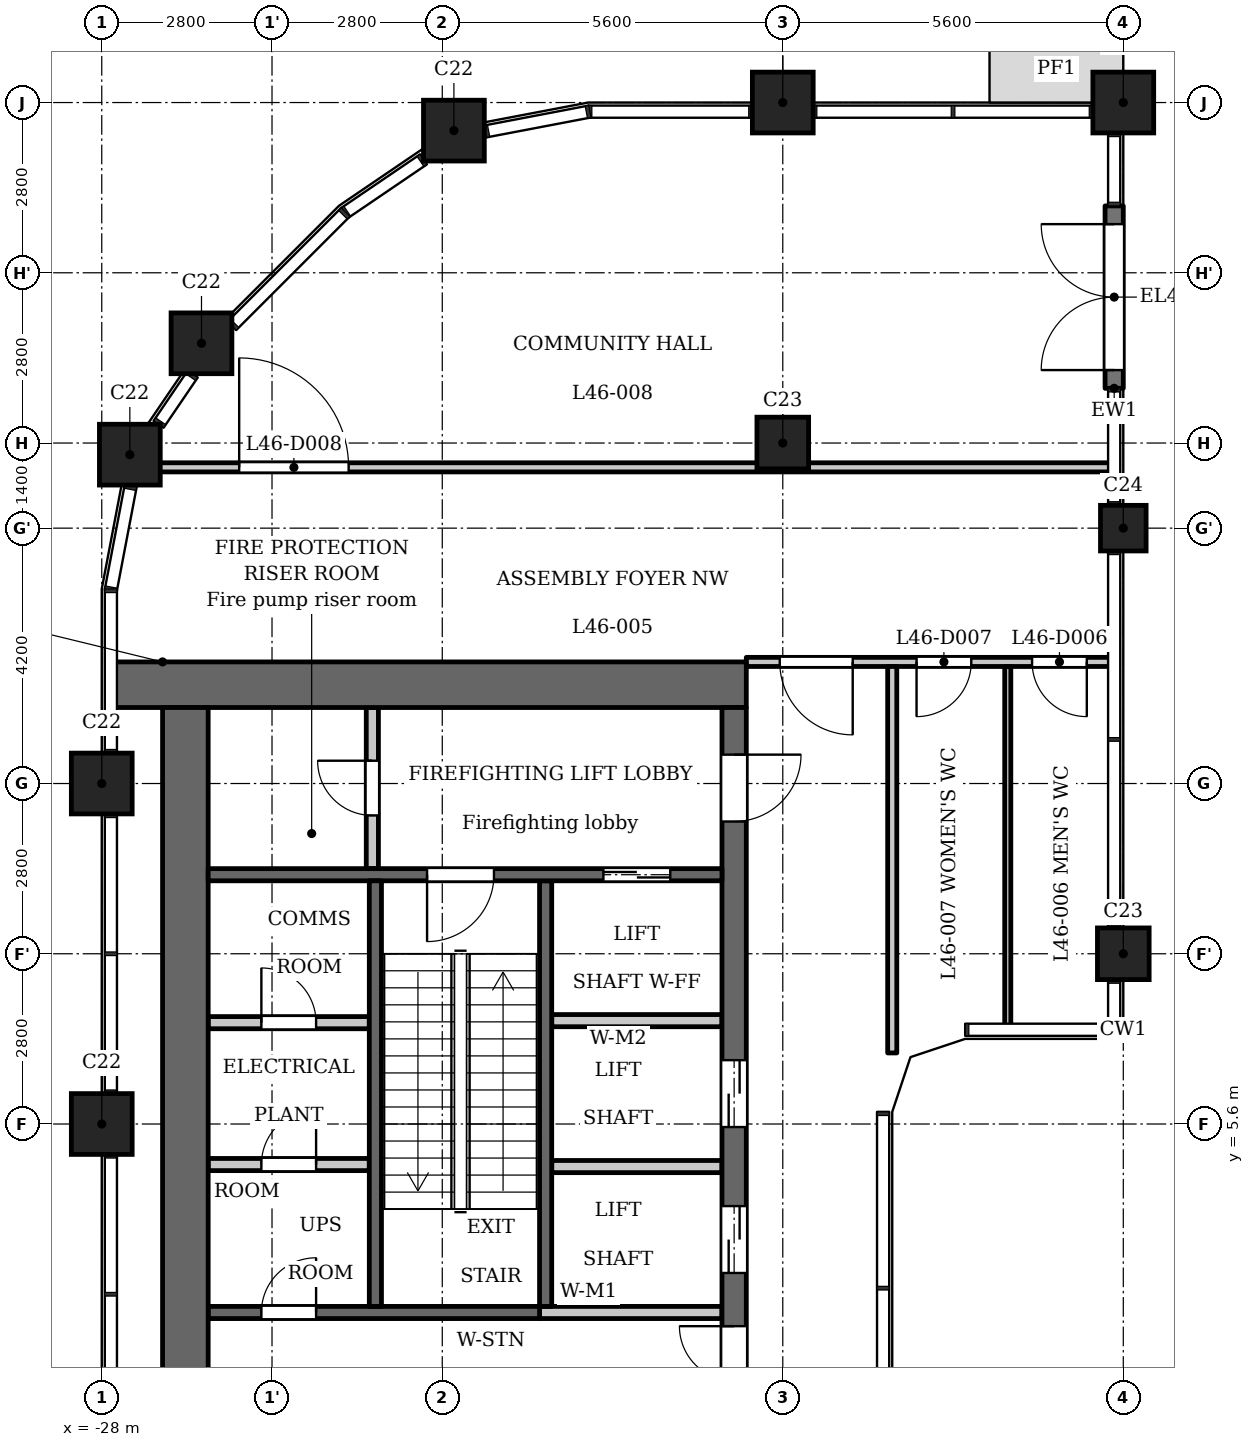
"""IFC4 building model, lengths in metres.
Left out: names, types, materials, properties, quantities, classifications, styles, units other than length and angle.
Written with IfcOpenShell. Run it as: python <this file> out.ifc"""

import sys

from ifc_helpers import new_model, si_unit, direction, frame, frame_2d, origin, origin_2d, place, context, subcontext, project, spatial, polyline, rectangle, outline, extrude, element, fill, save


model = new_model("IFC4")
c1 = context("Model", 3, precision=1e-05, world=origin(), true_north=direction((0.0, 1.0)))
c2 = subcontext(c1, "Body", "Model", "MODEL_VIEW")
j1 = project(units=[si_unit("LENGTHUNIT", "METRE"), si_unit("PLANEANGLEUNIT", "RADIAN")], contexts=[c1])
p1 = place(None, origin())
s1 = spatial("IfcSite", under=j1, at=p1, CompositionType="ELEMENT")
p2 = place(p1, origin())
s2 = spatial("IfcBuilding", under=s1, at=p2, CompositionType="ELEMENT")
p3 = place(p2, frame((0.0, 0.0, 178.1)))
s3 = spatial("IfcBuildingStorey", under=s2, at=p3, CompositionType="ELEMENT", Elevation=178.1)
for number, where, z_axis, x_axis in (
    (1, (-11.2, 22.4, 0.0), (0.0, 0.0, 1.0), (1.0, 0.0, 0.0)),
    (2, (-16.8, 22.4, 0.0), (0.0, 0.0, 1.0), (1.0, 0.0, 0.0)),
    (3, (-22.209, 21.938, 0.0), (0.0, 0.0, 1.0), (1.0, 0.0, 0.0)),
    (4, (-26.36, 18.44, 0.0), (0.0, 0.0, 1.0), (1.0, 0.0, 0.0)),
    (5, (-27.538, 16.609, 0.0), (0.0, 0.0, 1.0), (1.0, 0.0, 0.0)),
    (6, (-28.0, 11.2, 0.0), (0.0, 0.0, 1.0), (1.0, 0.0, 0.0)),
    (7, (-28.0, 5.6, 0.0), (0.0, 0.0, 1.0), (1.0, 0.0, 0.0)),
):
    element("IfcColumn", number, at=place(p3, frame(where, z_axis=z_axis, x_axis=x_axis)), inside=s3, PredefinedType="COLUMN", context=c2, shape_type="SweptSolid", body=[
        extrude(rectangle(XDim=1.0, YDim=1.0, at=origin_2d()), origin(), (0.0, 0.0, 1.0), 5.4),
    ])
for number, where, z_axis, x_axis in (
    (8, (-16.8, 16.8, 0.0), (0.0, 0.0, 1.0), (1.0, 0.0, 0.0)),
    (9, (-11.2, 8.4, 0.0), (0.0, 0.0, 1.0), (1.0, 0.0, 0.0)),
):
    element("IfcColumn", number, at=place(p3, frame(where, z_axis=z_axis, x_axis=x_axis)), inside=s3, PredefinedType="COLUMN", context=c2, shape_type="SweptSolid", body=[
        extrude(rectangle(XDim=0.85, YDim=0.85, at=origin_2d()), origin(), (0.0, 0.0, 1.0), 5.4),
    ])
p4 = place(p3, frame((-11.2, 15.4, 0.0), z_axis=(0.0, 0.0, 1.0), x_axis=(1.0, 0.0, 0.0)))
e10 = element("IfcColumn", 10, at=p4, inside=s3, PredefinedType="COLUMN", context=c2, shape_type="SweptSolid", body=[
    extrude(rectangle(XDim=0.75, YDim=0.75, at=origin_2d()), origin(), (0.0, 0.0, 1.0), 5.4),
])
p5 = place(p3, frame((-11.35, 17.7, 0.0), z_axis=(0.0, 0.0, 1.0), x_axis=(0.0, 1.0, 0.0)))
e11 = element("IfcWall", 11, at=p5, inside=s3, PredefinedType="SOLIDWALL", context=c2, shape_type="SweptSolid", body=[
    extrude(rectangle(XDim=3.0, YDim=0.3, at=frame_2d((1.5, 0.0))), origin(), (0.0, 0.0, 1.0), 4.95),
])
p6 = place(p5, frame((0.3, 0.0, 0.0)))
e12 = element("IfcOpeningElement", 12, at=p6, cuts=e11, PredefinedType="OPENING", context=c2, shape_type="SweptSolid", body=[
    extrude(rectangle(XDim=2.4, YDim=2.3, at=frame_2d((1.2, 1.15))), frame((0.0, 0.16, 0.0), z_axis=(0.0, -1.0, 0.0), x_axis=(1.0, 0.0, 0.0)), (0.0, 0.0, 1.0), 0.32),
])
p7 = place(p3, frame((-20.7, 2.6, 0.0), z_axis=(0.0, 0.0, 1.0), x_axis=(0.0, 1.0, 0.0)))
e13 = element("IfcWall", 13, at=p7, inside=s3, PredefinedType="SHEAR", context=c2, shape_type="SweptSolid", body=[
    extrude(rectangle(XDim=7.0, YDim=0.2, at=frame_2d((3.5, 0.0))), origin(), (0.0, 0.0, 1.0), 4.95),
])
p8 = place(p3, frame((-20.8, 2.5, 0.0), z_axis=(0.0, 0.0, 1.0), x_axis=(-1.0, 0.0, 0.0)))
e14 = element("IfcWall", 14, at=p8, inside=s3, PredefinedType="SHEAR", context=c2, shape_type="SweptSolid", body=[
    extrude(rectangle(XDim=5.45, YDim=0.2, at=frame_2d((2.725, 0.0))), origin(), (0.0, 0.0, 1.0), 4.95),
])
p9 = place(p8, frame((3.675, 0.0, 0.0)))
e15 = element("IfcOpeningElement", 15, at=p9, cuts=e14, PredefinedType="OPENING", context=c2, shape_type="SweptSolid", body=[
    extrude(rectangle(XDim=0.9, YDim=2.1, at=frame_2d((0.45, 1.05))), frame((0.0, 0.11, 0.0), z_axis=(0.0, -1.0, 0.0), x_axis=(1.0, 0.0, 0.0)), (0.0, 0.0, 1.0), 0.22),
])
p10 = place(p3, frame((-17.4, 12.825, 0.0), z_axis=(0.0, 0.0, 1.0), x_axis=(-1.0, 0.0, 0.0)))
e16 = element("IfcWall", 16, at=p10, inside=s3, PredefinedType="SHEAR", context=c2, shape_type="SweptSolid", body=[
    extrude(rectangle(XDim=10.4, YDim=0.75, at=frame_2d((5.2, 0.0))), origin(), (0.0, 0.0, 1.0), 4.95),
])
p11 = place(p3, frame((-17.6, -12.45, 0.0), z_axis=(0.0, 0.0, 1.0), x_axis=(0.0, 1.0, 0.0)))
e17 = element("IfcWall", 17, at=p11, inside=s3, PredefinedType="SHEAR", context=c2, shape_type="SweptSolid", body=[
    extrude(rectangle(XDim=24.9, YDim=0.4, at=frame_2d((12.45, 0.0))), origin(), (0.0, 0.0, 1.0), 4.95),
])
p12 = place(p11, frame((6.85, 0.0, 0.0)))
e18 = element("IfcOpeningElement", 18, at=p12, cuts=e17, PredefinedType="OPENING", context=c2, shape_type="SweptSolid", body=[
    extrude(rectangle(XDim=0.9, YDim=2.1, at=frame_2d((0.45, 1.05))), frame((0.0, 0.21, 0.0), z_axis=(0.0, -1.0, 0.0), x_axis=(1.0, 0.0, 0.0)), (0.0, 0.0, 1.0), 0.42),
])
p13 = place(p11, frame((10.45, 0.0, 0.0)))
e19 = element("IfcOpeningElement", 19, at=p13, cuts=e17, PredefinedType="OPENING", context=c2, shape_type="SweptSolid", body=[
    extrude(rectangle(XDim=0.9, YDim=2.1, at=frame_2d((0.45, 1.05))), frame((0.0, 0.21, 0.0), z_axis=(0.0, -1.0, 0.0), x_axis=(1.0, 0.0, 0.0)), (0.0, 0.0, 1.0), 0.42),
])
p14 = place(p11, frame((15.6, 0.0, 0.0)))
e20 = element("IfcOpeningElement", 20, at=p14, cuts=e17, PredefinedType="OPENING", context=c2, shape_type="SweptSolid", body=[
    extrude(rectangle(XDim=1.1, YDim=2.1, at=frame_2d((0.55, 1.05))), frame((0.0, 0.21, 0.0), z_axis=(0.0, -1.0, 0.0), x_axis=(1.0, 0.0, 0.0)), (0.0, 0.0, 1.0), 0.42),
])
p15 = place(p11, frame((18.0, 0.0, 0.0)))
e21 = element("IfcOpeningElement", 21, at=p15, cuts=e17, PredefinedType="OPENING", context=c2, shape_type="SweptSolid", body=[
    extrude(rectangle(XDim=1.1, YDim=2.1, at=frame_2d((0.55, 1.05))), frame((0.0, 0.21, 0.0), z_axis=(0.0, -1.0, 0.0), x_axis=(1.0, 0.0, 0.0)), (0.0, 0.0, 1.0), 0.42),
])
p16 = place(p11, frame((23.025, 0.0, 0.0)))
e22 = element("IfcOpeningElement", 22, at=p16, cuts=e17, PredefinedType="OPENING", context=c2, shape_type="SweptSolid", body=[
    extrude(rectangle(XDim=1.1, YDim=2.1, at=frame_2d((0.55, 1.05))), frame((0.0, 0.21, 0.0), z_axis=(0.0, -1.0, 0.0), x_axis=(1.0, 0.0, 0.0)), (0.0, 0.0, 1.0), 0.42),
])
p17 = place(p11, frame((0.775, 0.0, 0.0)))
e23 = element("IfcOpeningElement", 23, at=p17, cuts=e17, PredefinedType="OPENING", context=c2, shape_type="SweptSolid", body=[
    extrude(rectangle(XDim=1.1, YDim=2.1, at=frame_2d((0.55, 1.05))), frame((0.0, 0.21, 0.0), z_axis=(0.0, -1.0, 0.0), x_axis=(1.0, 0.0, 0.0)), (0.0, 0.0, 1.0), 0.42),
])
p18 = place(p11, frame((12.925, 0.0, 0.0)))
e24 = element("IfcOpeningElement", 24, at=p18, cuts=e17, PredefinedType="OPENING", context=c2, shape_type="SweptSolid", body=[
    extrude(rectangle(XDim=1.8, YDim=2.1, at=frame_2d((0.9, 1.05))), frame((0.0, 0.21, 0.0), z_axis=(0.0, -1.0, 0.0), x_axis=(1.0, 0.0, 0.0)), (0.0, 0.0, 1.0), 0.42),
])
p19 = place(p3, frame((-26.625, -12.45, 0.0), z_axis=(0.0, 0.0, 1.0), x_axis=(0.0, 1.0, 0.0)))
e25 = element("IfcWall", 25, at=p19, inside=s3, PredefinedType="SHEAR", context=c2, shape_type="SweptSolid", body=[
    extrude(rectangle(XDim=24.9, YDim=0.75, at=frame_2d((12.45, 0.0))), origin(), (0.0, 0.0, 1.0), 4.95),
])
p20 = place(p3, frame((-23.55, 9.8, 0.0), z_axis=(0.0, 0.0, 1.0), x_axis=(0.0, 1.0, 0.0)))
e26 = element("IfcWall", 26, at=p20, inside=s3, PredefinedType="PARTITIONING", context=c2, shape_type="SweptSolid", body=[
    extrude(rectangle(XDim=2.65, YDim=0.2, at=frame_2d((1.325, 0.0))), origin(), (0.0, 0.0, 1.0), 4.95),
])
p21 = place(p20, frame((0.875, 0.0, 0.0)))
e27 = element("IfcOpeningElement", 27, at=p21, cuts=e26, PredefinedType="OPENING", context=c2, shape_type="SweptSolid", body=[
    extrude(rectangle(XDim=0.9, YDim=2.1, at=frame_2d((0.45, 1.05))), frame((0.0, 0.11, 0.0), z_axis=(0.0, -1.0, 0.0), x_axis=(1.0, 0.0, 0.0)), (0.0, 0.0, 1.0), 0.22),
])
p22 = place(p3, frame((-23.6, 4.933, 0.0), z_axis=(0.0, 0.0, 1.0), x_axis=(-1.0, 0.0, 0.0)))
e28 = element("IfcWall", 28, at=p22, inside=s3, PredefinedType="PARTITIONING", context=c2, shape_type="SweptSolid", body=[
    extrude(rectangle(XDim=2.65, YDim=0.2, at=frame_2d((1.325, 0.0))), origin(), (0.0, 0.0, 1.0), 4.95),
])
p23 = place(p22, frame((0.875, 0.0, 0.0)))
e29 = element("IfcOpeningElement", 29, at=p23, cuts=e28, PredefinedType="OPENING", context=c2, shape_type="SweptSolid", body=[
    extrude(rectangle(XDim=0.9, YDim=2.1, at=frame_2d((0.45, 1.05))), frame((0.0, 0.11, 0.0), z_axis=(0.0, -1.0, 0.0), x_axis=(1.0, 0.0, 0.0)), (0.0, 0.0, 1.0), 0.22),
])
p24 = place(p3, frame((-23.6, 7.267, 0.0), z_axis=(0.0, 0.0, 1.0), x_axis=(-1.0, 0.0, 0.0)))
e30 = element("IfcWall", 30, at=p24, inside=s3, PredefinedType="PARTITIONING", context=c2, shape_type="SweptSolid", body=[
    extrude(rectangle(XDim=2.65, YDim=0.2, at=frame_2d((1.325, 0.0))), origin(), (0.0, 0.0, 1.0), 4.95),
])
p25 = place(p24, frame((0.875, 0.0, 0.0)))
e31 = element("IfcOpeningElement", 31, at=p25, cuts=e30, PredefinedType="OPENING", context=c2, shape_type="SweptSolid", body=[
    extrude(rectangle(XDim=0.9, YDim=2.1, at=frame_2d((0.45, 1.05))), frame((0.0, 0.11, 0.0), z_axis=(0.0, -1.0, 0.0), x_axis=(1.0, 0.0, 0.0)), (0.0, 0.0, 1.0), 0.22),
])
p26 = place(p3, frame((-17.8, 2.5, 0.0), z_axis=(0.0, 0.0, 1.0), x_axis=(-1.0, 0.0, 0.0)))
e32 = element("IfcWall", 32, at=p26, inside=s3, PredefinedType="PARTITIONING", context=c2, shape_type="SweptSolid", body=[
    extrude(rectangle(XDim=3.0, YDim=0.2, at=frame_2d((1.5, 0.0))), origin(), (0.0, 0.0, 1.0), 4.95),
])
for number, where, z_axis, x_axis in (
    (33, (-17.8, 4.9, 0.0), (0.0, 0.0, 1.0), (-1.0, 0.0, 0.0)),
    (34, (-17.8, 7.3, 0.0), (0.0, 0.0, 1.0), (-1.0, 0.0, 0.0)),
):
    element("IfcWall", number, at=place(p3, frame(where, z_axis=z_axis, x_axis=x_axis)), inside=s3, PredefinedType="PARTITIONING", context=c2, shape_type="SweptSolid", body=[
        extrude(rectangle(XDim=2.8, YDim=0.2, at=frame_2d((1.4, 0.0))), origin(), (0.0, 0.0, 1.0), 4.95),
    ])
p27 = place(p3, frame((-17.8, 9.7, 0.0), z_axis=(0.0, 0.0, 1.0), x_axis=(-1.0, 0.0, 0.0)))
e35 = element("IfcWall", 35, at=p27, inside=s3, PredefinedType="SHEAR", context=c2, shape_type="SweptSolid", body=[
    extrude(rectangle(XDim=8.45, YDim=0.2, at=frame_2d((4.225, 0.0))), origin(), (0.0, 0.0, 1.0), 4.95),
])
p28 = place(p27, frame((0.85, 0.0, 0.0)))
e36 = element("IfcOpeningElement", 36, at=p28, cuts=e35, PredefinedType="OPENING", context=c2, shape_type="SweptSolid", body=[
    extrude(rectangle(XDim=1.1, YDim=2.1, at=frame_2d((0.55, 1.05))), frame((0.0, 0.11, 0.0), z_axis=(0.0, -1.0, 0.0), x_axis=(1.0, 0.0, 0.0)), (0.0, 0.0, 1.0), 0.22),
])
p29 = place(p27, frame((3.75, 0.0, 0.0)))
e37 = element("IfcOpeningElement", 37, at=p29, cuts=e35, PredefinedType="OPENING", context=c2, shape_type="SweptSolid", body=[
    extrude(rectangle(XDim=1.1, YDim=2.1, at=frame_2d((0.55, 1.05))), frame((0.0, 0.11, 0.0), z_axis=(0.0, -1.0, 0.0), x_axis=(1.0, 0.0, 0.0)), (0.0, 0.0, 1.0), 0.22),
])
p30 = place(p3, frame((-23.5, 2.6, 0.0), z_axis=(0.0, 0.0, 1.0), x_axis=(0.0, 1.0, 0.0)))
e38 = element("IfcWall", 38, at=p30, inside=s3, PredefinedType="SHEAR", context=c2, shape_type="SweptSolid", body=[
    extrude(rectangle(XDim=7.0, YDim=0.2, at=frame_2d((3.5, 0.0))), origin(), (0.0, 0.0, 1.0), 4.95),
])
p31 = place(p3, frame((-17.4, 13.2, 0.0), z_axis=(0.0, 0.0, 1.0), x_axis=(1.0, 0.0, 0.0)))
e39 = element("IfcWall", 39, at=p31, inside=s3, PredefinedType="PARTITIONING", context=c2, shape_type="SweptSolid", body=[
    extrude(rectangle(XDim=6.016, YDim=0.15, at=frame_2d((3.008, 0.0))), origin(), (0.0, 0.0, 1.0), 4.95),
])
p32 = place(p31, frame((0.55, 0.0, 0.0)))
e40 = element("IfcOpeningElement", 40, at=p32, cuts=e39, PredefinedType="OPENING", context=c2, shape_type="SweptSolid", body=[
    extrude(rectangle(XDim=1.2, YDim=2.1, at=frame_2d((0.6, 1.05))), frame((0.0, 0.085, 0.0), z_axis=(0.0, -1.0, 0.0), x_axis=(1.0, 0.0, 0.0)), (0.0, 0.0, 1.0), 0.17),
])
p33 = place(p31, frame((4.7, 0.0, 0.0)))
e41 = element("IfcOpeningElement", 41, at=p33, cuts=e39, PredefinedType="OPENING", context=c2, shape_type="SweptSolid", body=[
    extrude(rectangle(XDim=0.9, YDim=2.1, at=frame_2d((0.45, 1.05))), frame((0.0, 0.085, 0.0), z_axis=(0.0, -1.0, 0.0), x_axis=(1.0, 0.0, 0.0)), (0.0, 0.0, 1.0), 0.17),
])
p34 = place(p31, frame((2.8, 0.0, 0.0)))
e42 = element("IfcOpeningElement", 42, at=p34, cuts=e39, PredefinedType="OPENING", context=c2, shape_type="SweptSolid", body=[
    extrude(rectangle(XDim=0.9, YDim=2.1, at=frame_2d((0.45, 1.05))), frame((0.0, 0.085, 0.0), z_axis=(0.0, -1.0, 0.0), x_axis=(1.0, 0.0, 0.0)), (0.0, 0.0, 1.0), 0.17),
])
p35 = place(p3, frame((-27.52, 16.4, 0.0), z_axis=(0.0, 0.0, 1.0), x_axis=(1.0, 0.0, 0.0)))
e43 = element("IfcWall", 43, at=p35, inside=s3, PredefinedType="PARTITIONING", context=c2, shape_type="SweptSolid", body=[
    extrude(rectangle(XDim=16.136, YDim=0.15, at=frame_2d((8.068, 0.0))), origin(), (0.0, 0.0, 1.0), 4.95),
])
p36 = place(p35, frame((1.78, 0.0, 0.0)))
e44 = element("IfcOpeningElement", 44, at=p36, cuts=e43, PredefinedType="OPENING", context=c2, shape_type="SweptSolid", body=[
    extrude(rectangle(XDim=1.8, YDim=2.1, at=frame_2d((0.9, 1.05))), frame((0.0, 0.085, 0.0), z_axis=(0.0, -1.0, 0.0), x_axis=(1.0, 0.0, 0.0)), (0.0, 0.0, 1.0), 0.17),
])
p37 = place(p3, frame((-15.0, 6.769, 0.0), z_axis=(0.0, 0.0, 1.0), x_axis=(0.0, 1.0, 0.0)))
e45 = element("IfcWall", 45, at=p37, inside=s3, PredefinedType="PARTITIONING", context=c2, shape_type="SweptSolid", body=[
    extrude(rectangle(XDim=6.356, YDim=0.15, at=frame_2d((3.178, 0.0))), origin(), (0.0, 0.0, 1.0), 4.95),
])
p38 = place(p3, frame((-13.1, 7.184, 0.0), z_axis=(0.0, 0.0, 1.0), x_axis=(0.0, 1.0, 0.0)))
e46 = element("IfcWall", 46, at=p38, inside=s3, PredefinedType="PARTITIONING", context=c2, shape_type="SweptSolid", body=[
    extrude(rectangle(XDim=5.941, YDim=0.1, at=frame_2d((2.97, 0.0))), origin(), (0.0, 0.0, 1.0), 4.95),
])
p39 = place(p3, origin())
e47 = element("IfcWall", 47, at=p39, inside=s3, PredefinedType="SOLIDWALL", context=c2, shape_type="SweptSolid", body=[
    extrude(outline(polyline([(-15.0, 5.8), (-14.7, 6.7), (-13.8, 7.0), (-13.8, 7.3), (-13.849, 7.3), (-14.937, 6.937), (-15.3, 5.849), (-15.3, 5.8), (-15.0, 5.8)])), origin(), (0.0, 0.0, 1.0), 4.95),
])
p40 = place(p6, origin())
e48 = element("IfcDoor", 48, at=p40, inside=s3, OperationType="SINGLE_SWING_LEFT", PredefinedType="DOOR", context=c2, shape_type="SweptSolid", body=[
    extrude(rectangle(XDim=2.4, YDim=2.3, at=frame_2d((1.2, 1.15))), frame((0.0, 0.025, 0.0), z_axis=(0.0, -1.0, 0.0), x_axis=(1.0, 0.0, 0.0)), (0.0, 0.0, 1.0), 0.05),
])
fill(e12, e48)
p41 = place(p14, origin())
e49 = element("IfcDoor", 49, at=p41, inside=s3, OperationType="DOUBLE_DOOR_SLIDING", PredefinedType="DOOR", context=c2, shape_type="SweptSolid", body=[
    extrude(rectangle(XDim=1.1, YDim=2.1, at=frame_2d((0.55, 1.05))), frame((0.0, 0.025, 0.0), z_axis=(0.0, -1.0, 0.0), x_axis=(1.0, 0.0, 0.0)), (0.0, 0.0, 1.0), 0.05),
])
fill(e20, e49)
p42 = place(p15, origin())
e50 = element("IfcDoor", 50, at=p42, inside=s3, OperationType="DOUBLE_DOOR_SLIDING", PredefinedType="DOOR", context=c2, shape_type="SweptSolid", body=[
    extrude(rectangle(XDim=1.1, YDim=2.1, at=frame_2d((0.55, 1.05))), frame((0.0, 0.025, 0.0), z_axis=(0.0, -1.0, 0.0), x_axis=(1.0, 0.0, 0.0)), (0.0, 0.0, 1.0), 0.05),
])
fill(e21, e50)
p43 = place(p28, origin())
e51 = element("IfcDoor", 51, at=p43, inside=s3, OperationType="DOUBLE_DOOR_SLIDING", PredefinedType="DOOR", context=c2, shape_type="SweptSolid", body=[
    extrude(rectangle(XDim=1.1, YDim=2.1, at=frame_2d((0.55, 1.05))), frame((0.0, 0.025, 0.0), z_axis=(0.0, -1.0, 0.0), x_axis=(1.0, 0.0, 0.0)), (0.0, 0.0, 1.0), 0.05),
])
fill(e36, e51)
p44 = place(p16, origin())
e52 = element("IfcDoor", 52, at=p44, inside=s3, OperationType="SINGLE_SWING_RIGHT", PredefinedType="DOOR", context=c2, shape_type="SweptSolid", body=[
    extrude(rectangle(XDim=1.1, YDim=2.1, at=frame_2d((0.55, 1.05))), frame((0.0, 0.025, 0.0), z_axis=(0.0, -1.0, 0.0), x_axis=(1.0, 0.0, 0.0)), (0.0, 0.0, 1.0), 0.05),
])
fill(e22, e52)
p45 = place(p21, origin())
e53 = element("IfcDoor", 53, at=p45, inside=s3, OperationType="SINGLE_SWING_LEFT", PredefinedType="DOOR", context=c2, shape_type="SweptSolid", body=[
    extrude(rectangle(XDim=0.9, YDim=2.1, at=frame_2d((0.45, 1.05))), frame((0.0, 0.025, 0.0), z_axis=(0.0, -1.0, 0.0), x_axis=(1.0, 0.0, 0.0)), (0.0, 0.0, 1.0), 0.05),
])
fill(e27, e53)
p46 = place(p29, origin())
e54 = element("IfcDoor", 54, at=p46, inside=s3, OperationType="SINGLE_SWING_LEFT", PredefinedType="DOOR", context=c2, shape_type="SweptSolid", body=[
    extrude(rectangle(XDim=1.1, YDim=2.1, at=frame_2d((0.55, 1.05))), frame((0.0, 0.025, 0.0), z_axis=(0.0, -1.0, 0.0), x_axis=(1.0, 0.0, 0.0)), (0.0, 0.0, 1.0), 0.05),
])
fill(e37, e54)
p47 = place(p18, origin())
e55 = element("IfcDoor", 55, at=p47, inside=s3, OperationType="DOUBLE_DOOR_SINGLE_SWING", PredefinedType="DOOR", context=c2, shape_type="SweptSolid", body=[
    extrude(rectangle(XDim=1.8, YDim=2.1, at=frame_2d((0.9, 1.05))), frame((0.0, 0.025, 0.0), z_axis=(0.0, -1.0, 0.0), x_axis=(1.0, 0.0, 0.0)), (0.0, 0.0, 1.0), 0.05),
])
fill(e24, e55)
p48 = place(p23, origin())
e56 = element("IfcDoor", 56, at=p48, inside=s3, OperationType="SINGLE_SWING_LEFT", PredefinedType="DOOR", context=c2, shape_type="SweptSolid", body=[
    extrude(rectangle(XDim=0.9, YDim=2.1, at=frame_2d((0.45, 1.05))), frame((0.0, 0.025, 0.0), z_axis=(0.0, -1.0, 0.0), x_axis=(1.0, 0.0, 0.0)), (0.0, 0.0, 1.0), 0.05),
])
fill(e29, e56)
p49 = place(p25, origin())
e57 = element("IfcDoor", 57, at=p49, inside=s3, OperationType="SINGLE_SWING_RIGHT", PredefinedType="DOOR", context=c2, shape_type="SweptSolid", body=[
    extrude(rectangle(XDim=0.9, YDim=2.1, at=frame_2d((0.45, 1.05))), frame((0.0, 0.025, 0.0), z_axis=(0.0, -1.0, 0.0), x_axis=(1.0, 0.0, 0.0)), (0.0, 0.0, 1.0), 0.05),
])
fill(e31, e57)
p50 = place(p9, origin())
e58 = element("IfcDoor", 58, at=p50, inside=s3, OperationType="SINGLE_SWING_LEFT", PredefinedType="DOOR", context=c2, shape_type="SweptSolid", body=[
    extrude(rectangle(XDim=0.9, YDim=2.1, at=frame_2d((0.45, 1.05))), frame((0.0, 0.025, 0.0), z_axis=(0.0, -1.0, 0.0), x_axis=(1.0, 0.0, 0.0)), (0.0, 0.0, 1.0), 0.05),
])
fill(e15, e58)
p51 = place(p32, origin())
e59 = element("IfcDoor", 59, at=p51, inside=s3, OperationType="SINGLE_SWING_RIGHT", PredefinedType="DOOR", context=c2, shape_type="SweptSolid", body=[
    extrude(rectangle(XDim=1.2, YDim=2.1, at=frame_2d((0.6, 1.05))), frame((0.0, 0.025, 0.0), z_axis=(0.0, -1.0, 0.0), x_axis=(1.0, 0.0, 0.0)), (0.0, 0.0, 1.0), 0.05),
])
fill(e40, e59)
p52 = place(p33, origin())
e60 = element("IfcDoor", 60, at=p52, inside=s3, OperationType="SINGLE_SWING_RIGHT", PredefinedType="DOOR", context=c2, shape_type="SweptSolid", body=[
    extrude(rectangle(XDim=0.9, YDim=2.1, at=frame_2d((0.45, 1.05))), frame((0.0, 0.025, 0.0), z_axis=(0.0, -1.0, 0.0), x_axis=(1.0, 0.0, 0.0)), (0.0, 0.0, 1.0), 0.05),
])
fill(e41, e60)
p53 = place(p34, origin())
e61 = element("IfcDoor", 61, at=p53, inside=s3, OperationType="SINGLE_SWING_LEFT", PredefinedType="DOOR", context=c2, shape_type="SweptSolid", body=[
    extrude(rectangle(XDim=0.9, YDim=2.1, at=frame_2d((0.45, 1.05))), frame((0.0, 0.025, 0.0), z_axis=(0.0, -1.0, 0.0), x_axis=(1.0, 0.0, 0.0)), (0.0, 0.0, 1.0), 0.05),
])
fill(e42, e61)
p54 = place(p36, origin())
e62 = element("IfcDoor", 62, at=p54, inside=s3, OperationType="SINGLE_SWING_RIGHT", PredefinedType="DOOR", context=c2, shape_type="SweptSolid", body=[
    extrude(rectangle(XDim=1.8, YDim=2.1, at=frame_2d((0.9, 1.05))), frame((0.0, 0.025, 0.0), z_axis=(0.0, -1.0, 0.0), x_axis=(1.0, 0.0, 0.0)), (0.0, 0.0, 1.0), 0.05),
])
fill(e44, e62)
save(model, sys.argv[1])
